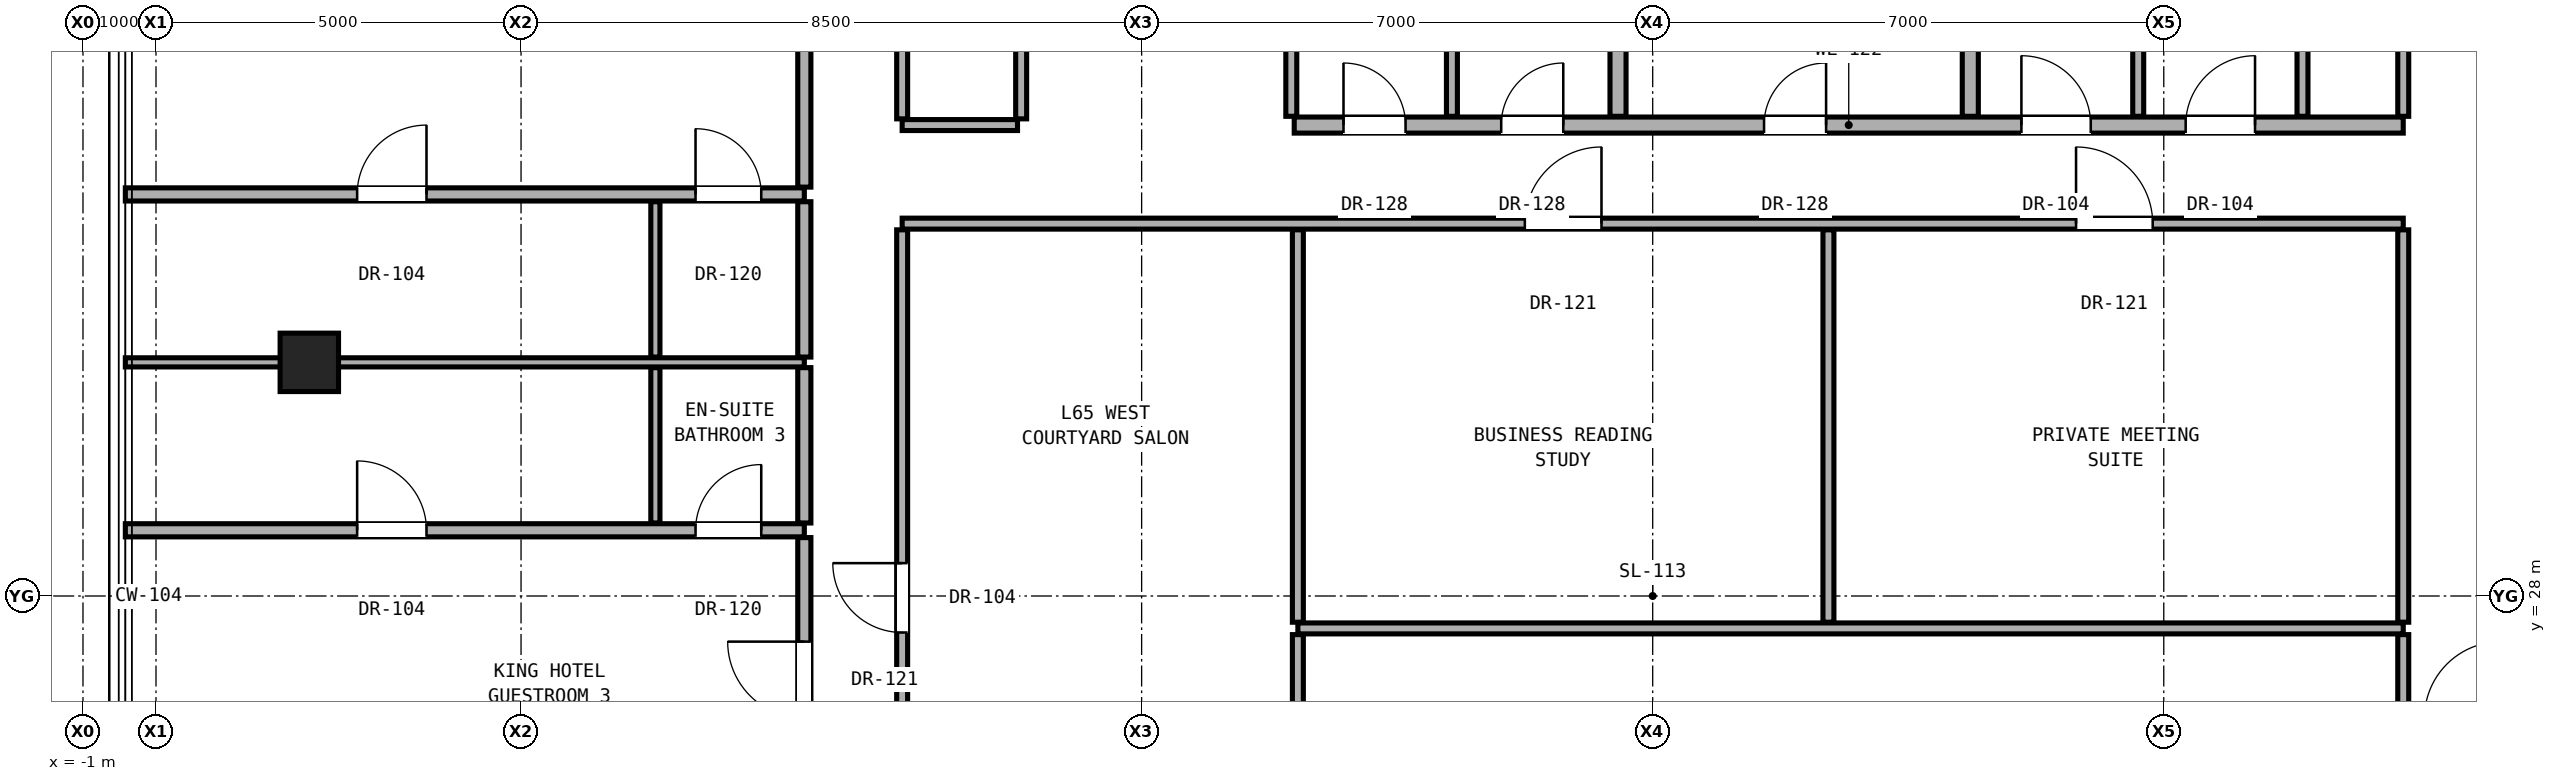
"""IFC4 building model, lengths in metres.
Left out: names, types, materials, properties, quantities, classifications, styles, units other than length and angle.
Written with IfcOpenShell. Run it as: python <this file> out.ifc"""

import sys

from ifc_helpers import new_model, si_unit, direction, frame, frame_2d, origin, origin_2d, place, context, subcontext, project, spatial, rectangle, hollow_rectangle, extrude, element, fill, save


model = new_model("IFC4")
c1 = context("Model", 3, precision=1e-05, world=origin(), true_north=direction((0.0, 1.0)))
c2 = subcontext(c1, "Body", "Model", "MODEL_VIEW")
j1 = project(units=[si_unit("LENGTHUNIT", "METRE"), si_unit("PLANEANGLEUNIT", "RADIAN")], contexts=[c1])
p1 = place(None, origin())
s1 = spatial("IfcSite", under=j1, at=p1, CompositionType="ELEMENT")
p2 = place(p1, origin())
s2 = spatial("IfcBuilding", under=s1, at=p2, CompositionType="ELEMENT")
p3 = place(p2, frame((0.0, 0.0, 229.3)))
s3 = spatial("IfcBuildingStorey", under=s2, at=p3, CompositionType="ELEMENT", Elevation=229.3)
p4 = place(p3, frame((2.1, 31.2, 0.0), z_axis=(0.0, 0.0, 1.0), x_axis=(1.0, 0.0, 0.0)))
e1 = element("IfcColumn", 1, at=p4, inside=s3, PredefinedType="COLUMN", context=c2, shape_type="SweptSolid", body=[
    extrude(hollow_rectangle(XDim=0.8, YDim=0.8, WallThickness=0.045, at=origin_2d()), origin(), (0.0, 0.0, 1.0), 3.3),
])
p5 = place(p3, frame((15.64, 27.556, 0.0), z_axis=(0.0, 0.0, 1.0), x_axis=(1.0, 0.0, 0.0)))
e2 = element("IfcWall", 2, at=p5, inside=s3, PredefinedType="PARTITIONING", context=c2, shape_type="SweptSolid", body=[
    extrude(rectangle(XDim=15.14, YDim=0.15, at=frame_2d((7.57, 0.0))), origin(), (0.0, 0.0, 1.0), 2.236),
])
p6 = place(p3, frame((-0.42, 28.9, 0.0), z_axis=(0.0, 0.0, 1.0), x_axis=(1.0, 0.0, 0.0)))
e3 = element("IfcWall", 3, at=p6, inside=s3, PredefinedType="PARTITIONING", context=c2, shape_type="SweptSolid", body=[
    extrude(rectangle(XDim=9.3, YDim=0.18, at=frame_2d((4.65, 0.0))), origin(), (0.0, 0.0, 1.0), 2.319),
])
p7 = place(p6, frame((3.175, 0.0, 0.0)))
e4 = element("IfcOpeningElement", 4, at=p7, cuts=e3, PredefinedType="OPENING", context=c2, shape_type="SweptSolid", body=[
    extrude(rectangle(XDim=0.95, YDim=2.15, at=frame_2d((0.475, 1.075))), frame((0.0, 0.1, 0.0), z_axis=(0.0, -1.0, 0.0), x_axis=(1.0, 0.0, 0.0)), (0.0, 0.0, 1.0), 0.2),
])
p8 = place(p6, frame((7.81, 0.0, 0.0)))
e5 = element("IfcOpeningElement", 5, at=p8, cuts=e3, PredefinedType="OPENING", context=c2, shape_type="SweptSolid", body=[
    extrude(rectangle(XDim=0.9, YDim=2.1, at=frame_2d((0.45, 1.05))), frame((0.0, 0.1, 0.0), z_axis=(0.0, -1.0, 0.0), x_axis=(1.0, 0.0, 0.0)), (0.0, 0.0, 1.0), 0.2),
])
p9 = place(p3, frame((-0.42, 31.2, 0.0), z_axis=(0.0, 0.0, 1.0), x_axis=(1.0, 0.0, 0.0)))
e6 = element("IfcWall", 6, at=p9, inside=s3, PredefinedType="PARTITIONING", context=c2, shape_type="SweptSolid", body=[
    extrude(rectangle(XDim=9.3, YDim=0.125, at=frame_2d((4.65, 0.0))), origin(), (0.0, 0.0, 1.0), 2.319),
])
p10 = place(p3, frame((10.22, 33.1, 0.0), z_axis=(0.0, 0.0, 1.0), x_axis=(1.0, 0.0, 0.0)))
e7 = element("IfcWall", 7, at=p10, inside=s3, PredefinedType="PARTITIONING", context=c2, shape_type="SweptSolid", body=[
    extrude(rectangle(XDim=20.56, YDim=0.15, at=frame_2d((10.28, 0.0))), origin(), (0.0, 0.0, 1.0), 2.236),
])
p11 = place(p10, frame((8.529, 0.0, 0.0)))
e8 = element("IfcOpeningElement", 8, at=p11, cuts=e7, PredefinedType="OPENING", context=c2, shape_type="SweptSolid", body=[
    extrude(rectangle(XDim=1.05, YDim=2.2, at=frame_2d((0.525, 1.1))), frame((0.0, 0.085, 0.0), z_axis=(0.0, -1.0, 0.0), x_axis=(1.0, 0.0, 0.0)), (0.0, 0.0, 1.0), 0.17),
])
p12 = place(p10, frame((16.079, 0.0, 0.0)))
e9 = element("IfcOpeningElement", 9, at=p12, cuts=e7, PredefinedType="OPENING", context=c2, shape_type="SweptSolid", body=[
    extrude(rectangle(XDim=1.05, YDim=2.2, at=frame_2d((0.525, 1.1))), frame((0.0, 0.085, 0.0), z_axis=(0.0, -1.0, 0.0), x_axis=(1.0, 0.0, 0.0)), (0.0, 0.0, 1.0), 0.17),
])
p13 = place(p3, frame((-0.42, 33.5, 0.0), z_axis=(0.0, 0.0, 1.0), x_axis=(1.0, 0.0, 0.0)))
e10 = element("IfcWall", 10, at=p13, inside=s3, PredefinedType="PARTITIONING", context=c2, shape_type="SweptSolid", body=[
    extrude(rectangle(XDim=9.3, YDim=0.18, at=frame_2d((4.65, 0.0))), origin(), (0.0, 0.0, 1.0), 2.319),
])
p14 = place(p13, frame((3.175, 0.0, 0.0)))
e11 = element("IfcOpeningElement", 11, at=p14, cuts=e10, PredefinedType="OPENING", context=c2, shape_type="SweptSolid", body=[
    extrude(rectangle(XDim=0.95, YDim=2.15, at=frame_2d((0.475, 1.075))), frame((0.0, 0.1, 0.0), z_axis=(0.0, -1.0, 0.0), x_axis=(1.0, 0.0, 0.0)), (0.0, 0.0, 1.0), 0.2),
])
p15 = place(p13, frame((7.81, 0.0, 0.0)))
e12 = element("IfcOpeningElement", 12, at=p15, cuts=e10, PredefinedType="OPENING", context=c2, shape_type="SweptSolid", body=[
    extrude(rectangle(XDim=0.9, YDim=2.1, at=frame_2d((0.45, 1.05))), frame((0.0, 0.1, 0.0), z_axis=(0.0, -1.0, 0.0), x_axis=(1.0, 0.0, 0.0)), (0.0, 0.0, 1.0), 0.2),
])
p16 = place(p3, frame((10.22, 34.45, 0.0), z_axis=(0.0, 0.0, 1.0), x_axis=(1.0, 0.0, 0.0)))
e13 = element("IfcWall", 13, at=p16, inside=s3, PredefinedType="PARTITIONING", context=c2, shape_type="SweptSolid", body=[
    extrude(rectangle(XDim=1.58, YDim=0.15, at=frame_2d((0.79, 0.0))), origin(), (0.0, 0.0, 1.0), 2.236),
])
p17 = place(p3, frame((15.59, 34.45, 0.0), z_axis=(0.0, 0.0, 1.0), x_axis=(1.0, 0.0, 0.0)))
e14 = element("IfcWall", 14, at=p17, inside=s3, PredefinedType="SOLIDWALL", context=c2, shape_type="SweptSolid", body=[
    extrude(rectangle(XDim=15.19, YDim=0.22, at=frame_2d((7.595, 0.0))), origin(), (0.0, 0.0, 1.0), 2.236),
])
p18 = place(p17, frame((6.435, 0.0, 0.0)))
e15 = element("IfcOpeningElement", 15, at=p18, cuts=e14, PredefinedType="OPENING", context=c2, shape_type="SweptSolid", body=[
    extrude(rectangle(XDim=0.85, YDim=2.01, at=frame_2d((0.425, 1.005))), frame((0.0, 0.12, 0.0), z_axis=(0.0, -1.0, 0.0), x_axis=(1.0, 0.0, 0.0)), (0.0, 0.0, 1.0), 0.24),
])
p19 = place(p17, frame((9.96, 0.0, 0.0)))
e16 = element("IfcOpeningElement", 16, at=p19, cuts=e14, PredefinedType="OPENING", context=c2, shape_type="SweptSolid", body=[
    extrude(rectangle(XDim=0.95, YDim=2.15, at=frame_2d((0.475, 1.075))), frame((0.0, 0.12, 0.0), z_axis=(0.0, -1.0, 0.0), x_axis=(1.0, 0.0, 0.0)), (0.0, 0.0, 1.0), 0.24),
])
p20 = place(p17, frame((12.21, 0.0, 0.0)))
e17 = element("IfcOpeningElement", 17, at=p20, cuts=e14, PredefinedType="OPENING", context=c2, shape_type="SweptSolid", body=[
    extrude(rectangle(XDim=0.95, YDim=2.15, at=frame_2d((0.475, 1.075))), frame((0.0, 0.12, 0.0), z_axis=(0.0, -1.0, 0.0), x_axis=(1.0, 0.0, 0.0)), (0.0, 0.0, 1.0), 0.24),
])
p21 = place(p17, frame((0.675, 0.0, 0.0)))
e18 = element("IfcOpeningElement", 18, at=p21, cuts=e14, PredefinedType="OPENING", context=c2, shape_type="SweptSolid", body=[
    extrude(rectangle(XDim=0.85, YDim=2.01, at=frame_2d((0.425, 1.005))), frame((0.0, 0.12, 0.0), z_axis=(0.0, -1.0, 0.0), x_axis=(1.0, 0.0, 0.0)), (0.0, 0.0, 1.0), 0.24),
])
p22 = place(p17, frame((2.835, 0.0, 0.0)))
e19 = element("IfcOpeningElement", 19, at=p22, cuts=e14, PredefinedType="OPENING", context=c2, shape_type="SweptSolid", body=[
    extrude(rectangle(XDim=0.85, YDim=2.01, at=frame_2d((0.425, 1.005))), frame((0.0, 0.12, 0.0), z_axis=(0.0, -1.0, 0.0), x_axis=(1.0, 0.0, 0.0)), (0.0, 0.0, 1.0), 0.24),
])
for number, where, z_axis, x_axis in (
    (20, (6.84, 29.0, 0.0), (0.0, 0.0, 1.0), (0.0, 1.0, 0.0)),
    (21, (6.84, 31.272, 0.0), (0.0, 0.0, 1.0), (0.0, 1.0, 0.0)),
):
    element("IfcWall", number, at=place(p3, frame(where, z_axis=z_axis, x_axis=x_axis)), inside=s3, PredefinedType="PARTITIONING", context=c2, shape_type="SweptSolid", body=[
        extrude(rectangle(XDim=2.127, YDim=0.125, at=frame_2d((1.064, 0.0))), origin(), (0.0, 0.0, 1.0), 2.396),
    ])
p23 = place(p3, frame((8.88, 24.9, 0.0), z_axis=(0.0, 0.0, 1.0), x_axis=(0.0, 1.0, 0.0)))
e22 = element("IfcWall", 22, at=p23, inside=s3, PredefinedType="PARTITIONING", context=c2, shape_type="SweptSolid", body=[
    extrude(rectangle(XDim=3.9, YDim=0.18, at=frame_2d((1.95, 0.0))), origin(), (0.0, 0.0, 1.0), 2.396),
])
p24 = place(p23, frame((1.425, 0.0, 0.0)))
e23 = element("IfcOpeningElement", 23, at=p24, cuts=e22, PredefinedType="OPENING", context=c2, shape_type="SweptSolid", body=[
    extrude(rectangle(XDim=1.05, YDim=2.2, at=frame_2d((0.525, 1.1))), frame((0.0, 0.1, 0.0), z_axis=(0.0, -1.0, 0.0), x_axis=(1.0, 0.0, 0.0)), (0.0, 0.0, 1.0), 0.2),
])
for number, where, z_axis, x_axis in (
    (24, (8.88, 29.0, 0.0), (0.0, 0.0, 1.0), (0.0, 1.0, 0.0)),
    (25, (8.88, 31.272, 0.0), (0.0, 0.0, 1.0), (0.0, 1.0, 0.0)),
):
    element("IfcWall", number, at=place(p3, frame(where, z_axis=z_axis, x_axis=x_axis)), inside=s3, PredefinedType="PARTITIONING", context=c2, shape_type="SweptSolid", body=[
        extrude(rectangle(XDim=2.127, YDim=0.18, at=frame_2d((1.064, 0.0))), origin(), (0.0, 0.0, 1.0), 2.396),
    ])
p25 = place(p3, frame((8.88, 33.6, 0.0), z_axis=(0.0, 0.0, 1.0), x_axis=(0.0, 1.0, 0.0)))
e26 = element("IfcWall", 26, at=p25, inside=s3, PredefinedType="PARTITIONING", context=c2, shape_type="SweptSolid", body=[
    extrude(rectangle(XDim=7.744, YDim=0.18, at=frame_2d((3.872, 0.0))), origin(), (0.0, 0.0, 1.0), 2.492),
])
p26 = place(p25, frame((3.347, 0.0, 0.0)))
e27 = element("IfcOpeningElement", 27, at=p26, cuts=e26, PredefinedType="OPENING", context=c2, shape_type="SweptSolid", body=[
    extrude(rectangle(XDim=1.05, YDim=2.2, at=frame_2d((0.525, 1.1))), frame((0.0, 0.1, 0.0), z_axis=(0.0, -1.0, 0.0), x_axis=(1.0, 0.0, 0.0)), (0.0, 0.0, 1.0), 0.2),
])
p27 = place(p3, frame((10.22, 22.935, 0.0), z_axis=(0.0, 0.0, 1.0), x_axis=(0.0, 1.0, 0.0)))
e28 = element("IfcWall", 28, at=p27, inside=s3, PredefinedType="PARTITIONING", context=c2, shape_type="SweptSolid", body=[
    extrude(rectangle(XDim=10.08, YDim=0.15, at=frame_2d((5.04, 0.0))), origin(), (0.0, 0.0, 1.0), 2.396),
])
p28 = place(p27, frame((4.565, 0.0, 0.0)))
e29 = element("IfcOpeningElement", 29, at=p28, cuts=e28, PredefinedType="OPENING", context=c2, shape_type="SweptSolid", body=[
    extrude(rectangle(XDim=0.95, YDim=2.15, at=frame_2d((0.475, 1.075))), frame((0.0, 0.085, 0.0), z_axis=(0.0, -1.0, 0.0), x_axis=(1.0, 0.0, 0.0)), (0.0, 0.0, 1.0), 0.17),
])
p29 = place(p3, frame((10.22, 34.535, 0.0), z_axis=(0.0, 0.0, 1.0), x_axis=(0.0, 1.0, 0.0)))
e30 = element("IfcWall", 30, at=p29, inside=s3, PredefinedType="PARTITIONING", context=c2, shape_type="SweptSolid", body=[
    extrude(rectangle(XDim=9.13, YDim=0.15, at=frame_2d((4.565, 0.0))), origin(), (0.0, 0.0, 1.0), 2.492),
])
p30 = place(p3, frame((11.85, 34.535, 0.0), z_axis=(0.0, 0.0, 1.0), x_axis=(0.0, 1.0, 0.0)))
e31 = element("IfcWall", 31, at=p30, inside=s3, PredefinedType="PARTITIONING", context=c2, shape_type="SweptSolid", body=[
    extrude(rectangle(XDim=2.845, YDim=0.15, at=frame_2d((1.422, 0.0))), origin(), (0.0, 0.0, 1.0), 3.1),
])
p31 = place(p3, frame((15.64, 22.935, 0.0), z_axis=(0.0, 0.0, 1.0), x_axis=(0.0, 1.0, 0.0)))
e32 = element("IfcWall", 32, at=p31, inside=s3, PredefinedType="PARTITIONING", context=c2, shape_type="SweptSolid", body=[
    extrude(rectangle(XDim=4.536, YDim=0.15, at=frame_2d((2.268, 0.0))), origin(), (0.0, 0.0, 1.0), 2.236),
])
p32 = place(p3, frame((15.64, 27.641, 0.0), z_axis=(0.0, 0.0, 1.0), x_axis=(0.0, 1.0, 0.0)))
e33 = element("IfcWall", 33, at=p32, inside=s3, PredefinedType="PARTITIONING", context=c2, shape_type="SweptSolid", body=[
    extrude(rectangle(XDim=5.374, YDim=0.15, at=frame_2d((2.687, 0.0))), origin(), (0.0, 0.0, 1.0), 2.236),
])
for number, where, z_axis, x_axis in (
    (34, (15.55, 34.57, 0.0), (0.0, 0.0, 1.0), (0.0, 1.0, 0.0)),
    (35, (17.75, 34.57, 0.0), (0.0, 0.0, 1.0), (0.0, 1.0, 0.0)),
):
    element("IfcWall", number, at=place(p3, frame(where, z_axis=z_axis, x_axis=x_axis)), inside=s3, PredefinedType="PARTITIONING", context=c2, shape_type="SweptSolid", body=[
        extrude(rectangle(XDim=2.81, YDim=0.15, at=frame_2d((1.405, 0.0))), origin(), (0.0, 0.0, 1.0), 3.1),
    ])
p33 = place(p3, frame((20.025, 34.57, 0.0), z_axis=(0.0, 0.0, 1.0), x_axis=(0.0, 1.0, 0.0)))
e36 = element("IfcWall", 36, at=p33, inside=s3, PredefinedType="SOLIDWALL", context=c2, shape_type="SweptSolid", body=[
    extrude(rectangle(XDim=2.81, YDim=0.22, at=frame_2d((1.405, 0.0))), origin(), (0.0, 0.0, 1.0), 3.1),
])
p34 = place(p3, frame((22.907, 27.641, 0.0), z_axis=(0.0, 0.0, 1.0), x_axis=(0.0, 1.0, 0.0)))
e37 = element("IfcWall", 37, at=p34, inside=s3, PredefinedType="PARTITIONING", context=c2, shape_type="SweptSolid", body=[
    extrude(rectangle(XDim=5.374, YDim=0.15, at=frame_2d((2.687, 0.0))), origin(), (0.0, 0.0, 1.0), 2.236),
])
p35 = place(p3, frame((24.85, 34.57, 0.0), z_axis=(0.0, 0.0, 1.0), x_axis=(0.0, 1.0, 0.0)))
e38 = element("IfcWall", 38, at=p35, inside=s3, PredefinedType="SOLIDWALL", context=c2, shape_type="SweptSolid", body=[
    extrude(rectangle(XDim=2.81, YDim=0.22, at=frame_2d((1.405, 0.0))), origin(), (0.0, 0.0, 1.0), 3.1),
])
for number, where, z_axis, x_axis in (
    (39, (27.15, 34.57, 0.0), (0.0, 0.0, 1.0), (0.0, 1.0, 0.0)),
    (40, (29.4, 34.57, 0.0), (0.0, 0.0, 1.0), (0.0, 1.0, 0.0)),
):
    element("IfcWall", number, at=place(p3, frame(where, z_axis=z_axis, x_axis=x_axis)), inside=s3, PredefinedType="PARTITIONING", context=c2, shape_type="SweptSolid", body=[
        extrude(rectangle(XDim=2.81, YDim=0.15, at=frame_2d((1.405, 0.0))), origin(), (0.0, 0.0, 1.0), 3.1),
    ])
p36 = place(p3, frame((30.78, 19.985, 0.0), z_axis=(0.0, 0.0, 1.0), x_axis=(0.0, 1.0, 0.0)))
e41 = element("IfcWall", 41, at=p36, inside=s3, PredefinedType="PARTITIONING", context=c2, shape_type="SweptSolid", body=[
    extrude(rectangle(XDim=7.486, YDim=0.15, at=frame_2d((3.743, 0.0))), origin(), (0.0, 0.0, 1.0), 2.396),
])
p37 = place(p3, frame((30.78, 27.641, 0.0), z_axis=(0.0, 0.0, 1.0), x_axis=(0.0, 1.0, 0.0)))
e42 = element("IfcWall", 42, at=p37, inside=s3, PredefinedType="PARTITIONING", context=c2, shape_type="SweptSolid", body=[
    extrude(rectangle(XDim=5.374, YDim=0.15, at=frame_2d((2.687, 0.0))), origin(), (0.0, 0.0, 1.0), 2.396),
])
p38 = place(p3, frame((30.78, 34.57, 0.0), z_axis=(0.0, 0.0, 1.0), x_axis=(0.0, 1.0, 0.0)))
e43 = element("IfcWall", 43, at=p38, inside=s3, PredefinedType="PARTITIONING", context=c2, shape_type="SweptSolid", body=[
    extrude(rectangle(XDim=9.095, YDim=0.15, at=frame_2d((4.547, 0.0))), origin(), (0.0, 0.0, 1.0), 2.492),
])
p39 = place(p18, origin())
e44 = element("IfcDoor", 44, at=p39, inside=s3, OperationType="SINGLE_SWING_RIGHT", PredefinedType="DOOR", context=c2, shape_type="SweptSolid", body=[
    extrude(rectangle(XDim=0.85, YDim=2.01, at=frame_2d((0.425, 1.005))), frame((0.0, 0.025, 0.0), z_axis=(0.0, -1.0, 0.0), x_axis=(1.0, 0.0, 0.0)), (0.0, 0.0, 1.0), 0.05),
])
fill(e15, e44)
p40 = place(p19, origin())
e45 = element("IfcDoor", 45, at=p40, inside=s3, OperationType="SINGLE_SWING_LEFT", PredefinedType="DOOR", context=c2, shape_type="SweptSolid", body=[
    extrude(rectangle(XDim=0.95, YDim=2.15, at=frame_2d((0.475, 1.075))), frame((0.0, 0.025, 0.0), z_axis=(0.0, -1.0, 0.0), x_axis=(1.0, 0.0, 0.0)), (0.0, 0.0, 1.0), 0.05),
])
fill(e16, e45)
p41 = place(p20, origin())
e46 = element("IfcDoor", 46, at=p41, inside=s3, OperationType="SINGLE_SWING_RIGHT", PredefinedType="DOOR", context=c2, shape_type="SweptSolid", body=[
    extrude(rectangle(XDim=0.95, YDim=2.15, at=frame_2d((0.475, 1.075))), frame((0.0, 0.025, 0.0), z_axis=(0.0, -1.0, 0.0), x_axis=(1.0, 0.0, 0.0)), (0.0, 0.0, 1.0), 0.05),
])
fill(e17, e46)
p42 = place(p21, origin())
e47 = element("IfcDoor", 47, at=p42, inside=s3, OperationType="SINGLE_SWING_LEFT", PredefinedType="DOOR", context=c2, shape_type="SweptSolid", body=[
    extrude(rectangle(XDim=0.85, YDim=2.01, at=frame_2d((0.425, 1.005))), frame((0.0, 0.025, 0.0), z_axis=(0.0, -1.0, 0.0), x_axis=(1.0, 0.0, 0.0)), (0.0, 0.0, 1.0), 0.05),
])
fill(e18, e47)
p43 = place(p22, origin())
e48 = element("IfcDoor", 48, at=p43, inside=s3, OperationType="SINGLE_SWING_RIGHT", PredefinedType="DOOR", context=c2, shape_type="SweptSolid", body=[
    extrude(rectangle(XDim=0.85, YDim=2.01, at=frame_2d((0.425, 1.005))), frame((0.0, 0.025, 0.0), z_axis=(0.0, -1.0, 0.0), x_axis=(1.0, 0.0, 0.0)), (0.0, 0.0, 1.0), 0.05),
])
fill(e19, e48)
p44 = place(p24, origin())
e49 = element("IfcDoor", 49, at=p44, inside=s3, OperationType="SINGLE_SWING_RIGHT", PredefinedType="DOOR", context=c2, shape_type="SweptSolid", body=[
    extrude(rectangle(XDim=1.05, YDim=2.2, at=frame_2d((0.525, 1.1))), frame((0.0, 0.025, 0.0), z_axis=(0.0, -1.0, 0.0), x_axis=(1.0, 0.0, 0.0)), (0.0, 0.0, 1.0), 0.05),
])
fill(e23, e49)
p45 = place(p7, origin())
e50 = element("IfcDoor", 50, at=p45, inside=s3, OperationType="SINGLE_SWING_LEFT", PredefinedType="DOOR", context=c2, shape_type="SweptSolid", body=[
    extrude(rectangle(XDim=0.95, YDim=2.15, at=frame_2d((0.475, 1.075))), frame((0.0, 0.025, 0.0), z_axis=(0.0, -1.0, 0.0), x_axis=(1.0, 0.0, 0.0)), (0.0, 0.0, 1.0), 0.05),
])
fill(e4, e50)
p46 = place(p8, origin())
e51 = element("IfcDoor", 51, at=p46, inside=s3, OperationType="SINGLE_SWING_RIGHT", PredefinedType="DOOR", context=c2, shape_type="SweptSolid", body=[
    extrude(rectangle(XDim=0.9, YDim=2.1, at=frame_2d((0.45, 1.05))), frame((0.0, 0.025, 0.0), z_axis=(0.0, -1.0, 0.0), x_axis=(1.0, 0.0, 0.0)), (0.0, 0.0, 1.0), 0.05),
])
fill(e5, e51)
p47 = place(p14, origin())
e52 = element("IfcDoor", 52, at=p47, inside=s3, OperationType="SINGLE_SWING_RIGHT", PredefinedType="DOOR", context=c2, shape_type="SweptSolid", body=[
    extrude(rectangle(XDim=0.95, YDim=2.15, at=frame_2d((0.475, 1.075))), frame((0.0, 0.025, 0.0), z_axis=(0.0, -1.0, 0.0), x_axis=(1.0, 0.0, 0.0)), (0.0, 0.0, 1.0), 0.05),
])
fill(e11, e52)
p48 = place(p15, origin())
e53 = element("IfcDoor", 53, at=p48, inside=s3, OperationType="SINGLE_SWING_LEFT", PredefinedType="DOOR", context=c2, shape_type="SweptSolid", body=[
    extrude(rectangle(XDim=0.9, YDim=2.1, at=frame_2d((0.45, 1.05))), frame((0.0, 0.025, 0.0), z_axis=(0.0, -1.0, 0.0), x_axis=(1.0, 0.0, 0.0)), (0.0, 0.0, 1.0), 0.05),
])
fill(e12, e53)
p49 = place(p28, origin())
e54 = element("IfcDoor", 54, at=p49, inside=s3, OperationType="SINGLE_SWING_RIGHT", PredefinedType="DOOR", context=c2, shape_type="SweptSolid", body=[
    extrude(rectangle(XDim=0.95, YDim=2.15, at=frame_2d((0.475, 1.075))), frame((0.0, 0.025, 0.0), z_axis=(0.0, -1.0, 0.0), x_axis=(1.0, 0.0, 0.0)), (0.0, 0.0, 1.0), 0.05),
])
fill(e29, e54)
p50 = place(p11, origin())
e55 = element("IfcDoor", 55, at=p50, inside=s3, OperationType="SINGLE_SWING_RIGHT", PredefinedType="DOOR", context=c2, shape_type="SweptSolid", body=[
    extrude(rectangle(XDim=1.05, YDim=2.2, at=frame_2d((0.525, 1.1))), frame((0.0, 0.025, 0.0), z_axis=(0.0, -1.0, 0.0), x_axis=(1.0, 0.0, 0.0)), (0.0, 0.0, 1.0), 0.05),
])
fill(e8, e55)
p51 = place(p12, origin())
e56 = element("IfcDoor", 56, at=p51, inside=s3, OperationType="SINGLE_SWING_LEFT", PredefinedType="DOOR", context=c2, shape_type="SweptSolid", body=[
    extrude(rectangle(XDim=1.05, YDim=2.2, at=frame_2d((0.525, 1.1))), frame((0.0, 0.025, 0.0), z_axis=(0.0, -1.0, 0.0), x_axis=(1.0, 0.0, 0.0)), (0.0, 0.0, 1.0), 0.05),
])
fill(e9, e56)
save(model, sys.argv[1])
